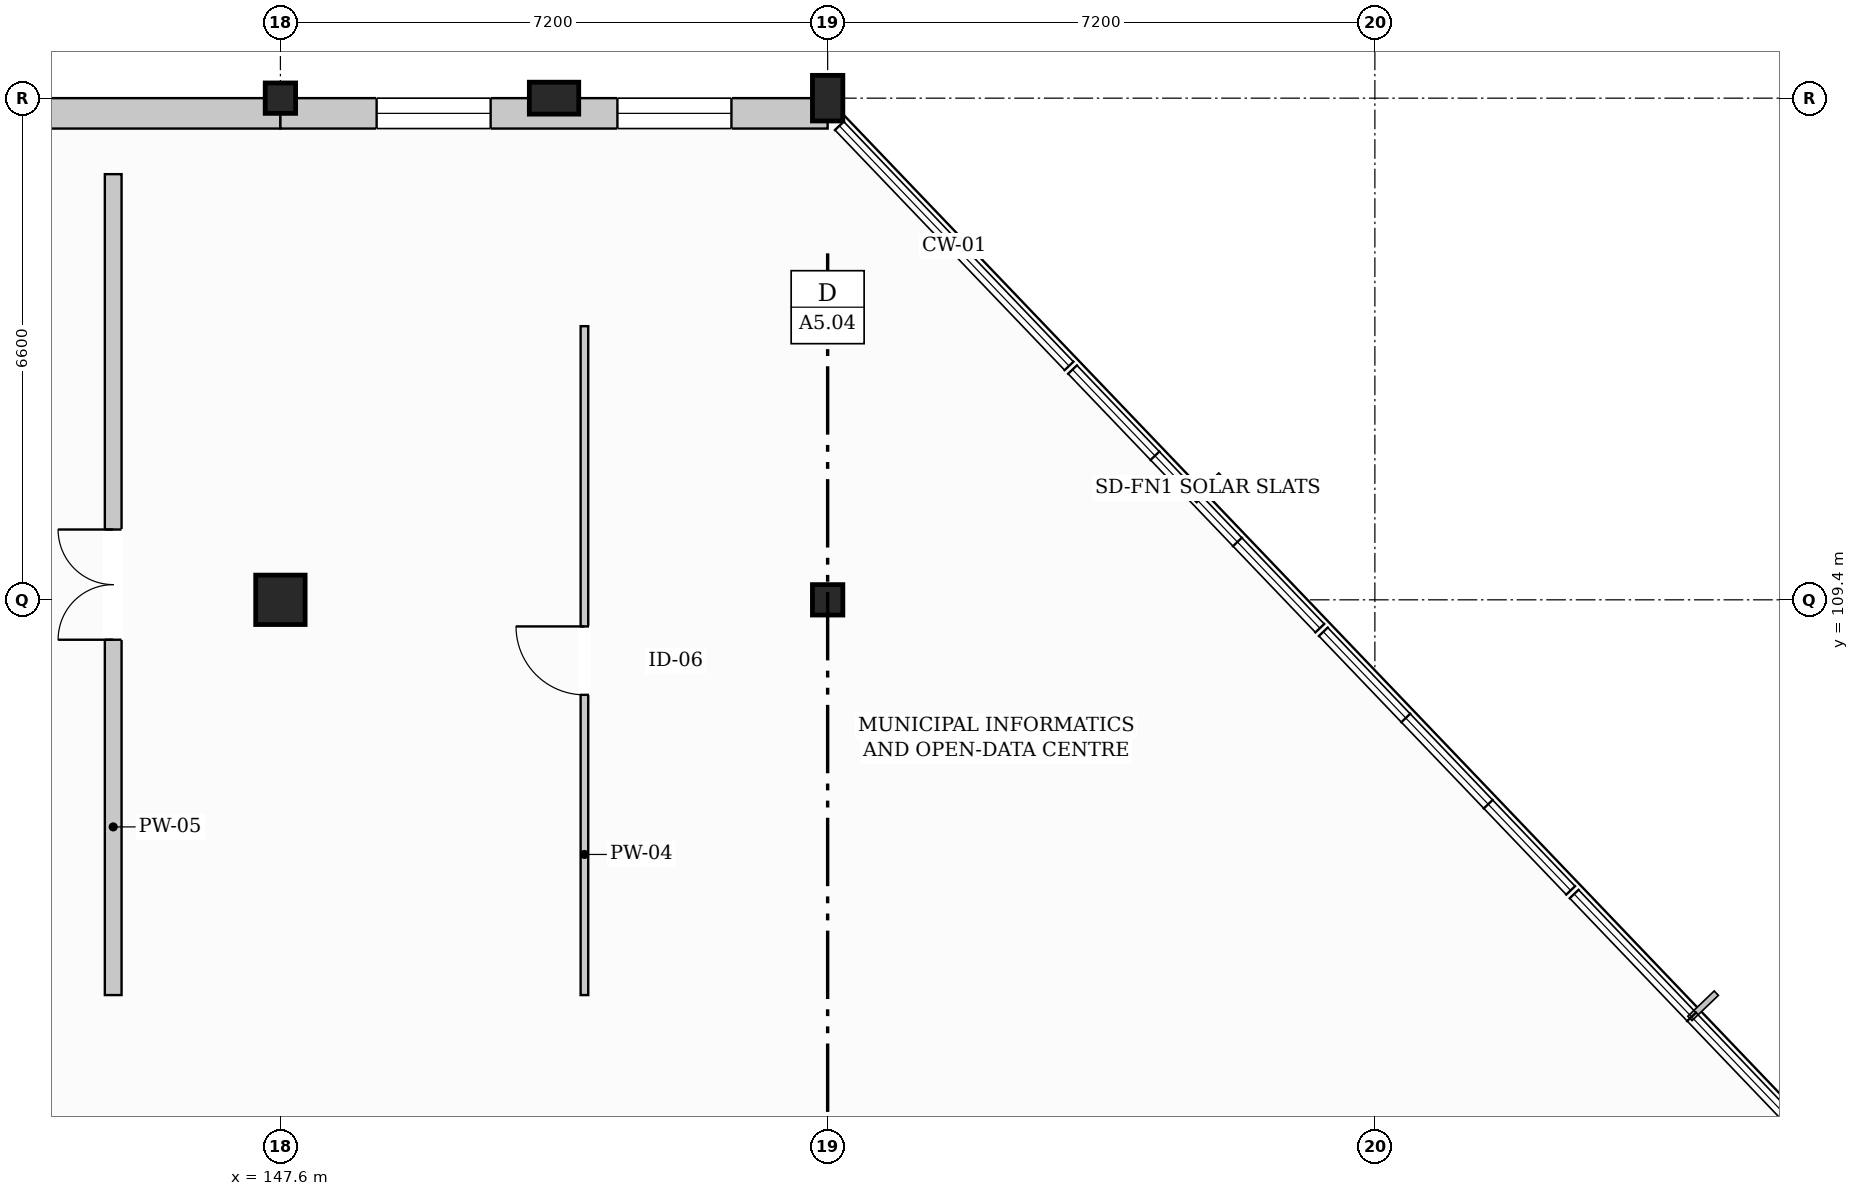
"""IFC4 building model, lengths in metres.
Left out: names, types, materials, properties, quantities, classifications, styles, units other than length and angle.
Written with IfcOpenShell. Run it as: python <this file> out.ifc"""

import sys

from ifc_helpers import new_model, si_unit, direction, frame, frame_2d, origin, origin_2d, place, context, subcontext, project, spatial, rectangle, extrude, element, fill, save


model = new_model("IFC4")
c1 = context("Model", 3, precision=1e-05, world=origin(), true_north=direction((0.0, 1.0)))
c2 = subcontext(c1, "Body", "Model", "MODEL_VIEW")
j1 = project(units=[si_unit("LENGTHUNIT", "METRE"), si_unit("PLANEANGLEUNIT", "RADIAN")], contexts=[c1])
p1 = place(None, origin())
s1 = spatial("IfcSite", under=j1, at=p1, CompositionType="ELEMENT")
p2 = place(p1, origin())
s2 = spatial("IfcBuilding", under=s1, at=p2, CompositionType="ELEMENT")
p3 = place(p2, frame((0.0, 0.0, 20.4)))
s3 = spatial("IfcBuildingStorey", under=s2, at=p3, CompositionType="ELEMENT", Elevation=20.4)
p4 = place(p3, frame((147.6, 109.4, 0.0), z_axis=(0.0, 0.0, 1.0), x_axis=(1.0, 0.0, 0.0)))
e1 = element("IfcColumn", 1, at=p4, inside=s3, PredefinedType="COLUMN", context=c2, shape_type="SweptSolid", body=[
    extrude(rectangle(XDim=0.65, YDim=0.65, at=origin_2d()), origin(), (0.0, 0.0, 1.0), 3.6),
])
for number, where, z_axis, x_axis in (
    (2, (147.6, 116.0, 0.0), (0.0, 0.0, 1.0), (1.0, 0.0, 0.0)),
    (3, (154.8, 109.4, 0.0), (0.0, 0.0, 1.0), (1.0, 0.0, 0.0)),
):
    element("IfcColumn", number, at=place(p3, frame(where, z_axis=z_axis, x_axis=x_axis)), inside=s3, PredefinedType="COLUMN", context=c2, shape_type="SweptSolid", body=[
        extrude(rectangle(XDim=0.4, YDim=0.4, at=origin_2d()), origin(), (0.0, 0.0, 1.0), 3.6),
    ])
p5 = place(p3, frame((154.8, 116.0, 0.0), z_axis=(0.0, 0.0, 1.0), x_axis=(1.0, 0.0, 0.0)))
e4 = element("IfcColumn", 4, at=p5, inside=s3, PredefinedType="COLUMN", context=c2, shape_type="SweptSolid", body=[
    extrude(rectangle(XDim=0.4, YDim=0.6, at=origin_2d()), origin(), (0.0, 0.0, 1.0), 3.6),
])
p6 = place(p3, frame((151.2, 116.0, 0.0), z_axis=(0.0, 0.0, 1.0), x_axis=(1.0, 0.0, 0.0)))
e5 = element("IfcColumn", 5, at=p6, inside=s3, PredefinedType="PILASTER", context=c2, shape_type="SweptSolid", body=[
    extrude(rectangle(XDim=0.65, YDim=0.42, at=origin_2d()), origin(), (0.0, 0.0, 1.0), 3.6),
])
p7 = place(p3, frame((138.6, 115.8, 0.0), z_axis=(0.0, 0.0, 1.0), x_axis=(1.0, 0.0, 0.0)))
e6 = element("IfcWall", 6, at=p7, inside=s3, PredefinedType="SOLIDWALL", context=c2, shape_type="SweptSolid", body=[
    extrude(rectangle(XDim=9.0, YDim=0.4, at=frame_2d((4.5, 0.0))), origin(), (0.0, 0.0, 1.0), 2.68),
])
p8 = place(p3, frame((147.6, 115.8, 0.0), z_axis=(0.0, 0.0, 1.0), x_axis=(1.0, 0.0, 0.0)))
e7 = element("IfcWall", 7, at=p8, inside=s3, PredefinedType="SOLIDWALL", context=c2, shape_type="SweptSolid", body=[
    extrude(rectangle(XDim=7.2, YDim=0.4, at=frame_2d((3.6, 0.0))), origin(), (0.0, 0.0, 1.0), 2.74),
])
p9 = place(p8, frame((1.266, 0.0, 0.75)))
e8 = element("IfcOpeningElement", 8, at=p9, cuts=e7, PredefinedType="OPENING", context=c2, shape_type="SweptSolid", body=[
    extrude(rectangle(XDim=1.5, YDim=1.6, at=frame_2d((0.75, 0.8))), frame((0.0, 0.21, 0.0), z_axis=(0.0, -1.0, 0.0), x_axis=(1.0, 0.0, 0.0)), (0.0, 0.0, 1.0), 0.42),
])
p10 = place(p8, frame((4.434, 0.0, 0.75)))
e9 = element("IfcOpeningElement", 9, at=p10, cuts=e7, PredefinedType="OPENING", context=c2, shape_type="SweptSolid", body=[
    extrude(rectangle(XDim=1.5, YDim=1.6, at=frame_2d((0.75, 0.8))), frame((0.0, 0.21, 0.0), z_axis=(0.0, -1.0, 0.0), x_axis=(1.0, 0.0, 0.0)), (0.0, 0.0, 1.0), 0.42),
])
p11 = place(p3, frame((145.4, 104.2, 0.0), z_axis=(0.0, 0.0, 1.0), x_axis=(0.0, 1.0, 0.0)))
e10 = element("IfcWall", 10, at=p11, inside=s3, PredefinedType="PARTITIONING", context=c2, shape_type="SweptSolid", body=[
    extrude(rectangle(XDim=10.8, YDim=0.22, at=frame_2d((5.4, 0.0))), origin(), (0.0, 0.0, 1.0), 2.66),
])
p12 = place(p11, frame((4.675, 0.0, 0.0)))
e11 = element("IfcOpeningElement", 11, at=p12, cuts=e10, PredefinedType="OPENING", context=c2, shape_type="SweptSolid", body=[
    extrude(rectangle(XDim=1.45, YDim=2.2, at=frame_2d((0.725, 1.1))), frame((0.0, 0.12, 0.0), z_axis=(0.0, -1.0, 0.0), x_axis=(1.0, 0.0, 0.0)), (0.0, 0.0, 1.0), 0.24),
])
p13 = place(p3, frame((151.6, 104.2, 0.0), z_axis=(0.0, 0.0, 1.0), x_axis=(0.0, 1.0, 0.0)))
e12 = element("IfcWall", 12, at=p13, inside=s3, PredefinedType="PARTITIONING", context=c2, shape_type="SweptSolid", body=[
    extrude(rectangle(XDim=8.8, YDim=0.1, at=frame_2d((4.4, 0.0))), origin(), (0.0, 0.0, 1.0), 2.72),
])
p14 = place(p13, frame((3.95, 0.0, 0.0)))
e13 = element("IfcOpeningElement", 13, at=p14, cuts=e12, PredefinedType="OPENING", context=c2, shape_type="SweptSolid", body=[
    extrude(rectangle(XDim=0.9, YDim=2.1, at=frame_2d((0.45, 1.05))), frame((0.0, 0.06, 0.0), z_axis=(0.0, -1.0, 0.0), x_axis=(1.0, 0.0, 0.0)), (0.0, 0.0, 1.0), 0.12),
])
p15 = place(p9, origin())
e14 = element("IfcWindow", 14, at=p15, inside=s3, PartitioningType="DOUBLE_PANEL_HORIZONTAL", PredefinedType="WINDOW", context=c2, shape_type="SweptSolid", body=[
    extrude(rectangle(XDim=1.5, YDim=1.6, at=frame_2d((0.75, 0.8))), frame((0.0, 0.03, 0.0), z_axis=(0.0, -1.0, 0.0), x_axis=(1.0, 0.0, 0.0)), (0.0, 0.0, 1.0), 0.06),
])
fill(e8, e14)
p16 = place(p10, origin())
e15 = element("IfcWindow", 15, at=p16, inside=s3, PartitioningType="DOUBLE_PANEL_HORIZONTAL", PredefinedType="WINDOW", context=c2, shape_type="SweptSolid", body=[
    extrude(rectangle(XDim=1.5, YDim=1.6, at=frame_2d((0.75, 0.8))), frame((0.0, 0.03, 0.0), z_axis=(0.0, -1.0, 0.0), x_axis=(1.0, 0.0, 0.0)), (0.0, 0.0, 1.0), 0.06),
])
fill(e9, e15)
p17 = place(p12, origin())
e16 = element("IfcDoor", 16, at=p17, inside=s3, OperationType="DOUBLE_DOOR_SINGLE_SWING", PredefinedType="DOOR", context=c2, shape_type="SweptSolid", body=[
    extrude(rectangle(XDim=1.45, YDim=2.2, at=frame_2d((0.725, 1.1))), frame((0.0, 0.025, 0.0), z_axis=(0.0, -1.0, 0.0), x_axis=(1.0, 0.0, 0.0)), (0.0, 0.0, 1.0), 0.05),
])
fill(e11, e16)
p18 = place(p14, origin())
e17 = element("IfcDoor", 17, at=p18, inside=s3, OperationType="SINGLE_SWING_RIGHT", PredefinedType="DOOR", context=c2, shape_type="SweptSolid", body=[
    extrude(rectangle(XDim=0.9, YDim=2.1, at=frame_2d((0.45, 1.05))), frame((0.0, 0.025, 0.0), z_axis=(0.0, -1.0, 0.0), x_axis=(1.0, 0.0, 0.0)), (0.0, 0.0, 1.0), 0.05),
])
fill(e13, e17)
save(model, sys.argv[1])
